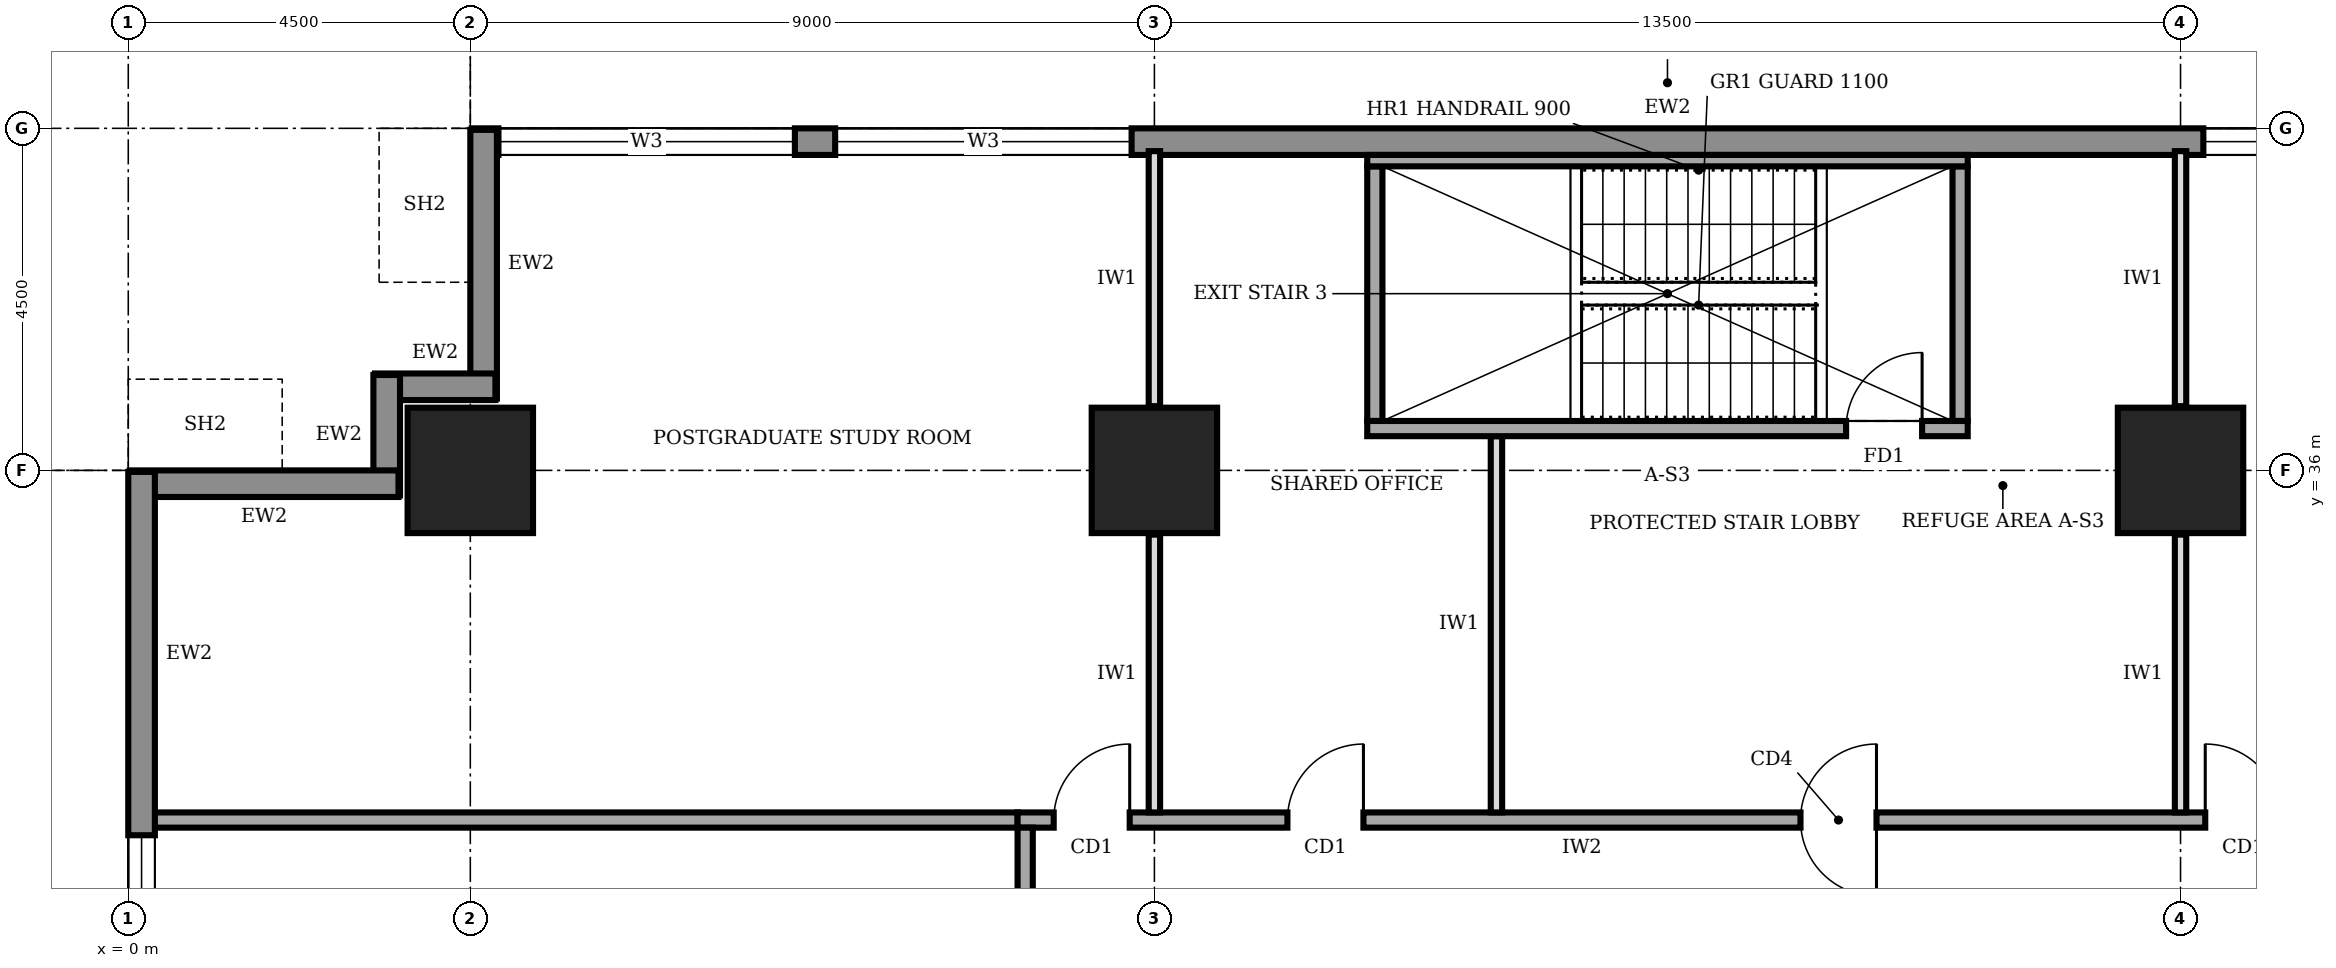
"""IFC4 building model, lengths in metres.
Left out: names, types, materials, properties, quantities, classifications, styles, units other than length and angle.
Written with IfcOpenShell. Run it as: python <this file> out.ifc"""

import sys

from ifc_helpers import new_model, si_unit, direction, frame, frame_2d, origin, origin_2d, place, context, subcontext, project, spatial, rectangle, extrude, element, fill, save


model = new_model("IFC4")
c1 = context("Model", 3, precision=1e-05, world=origin(), true_north=direction((0.0, 1.0)))
c2 = subcontext(c1, "Body", "Model", "MODEL_VIEW")
j1 = project(units=[si_unit("LENGTHUNIT", "METRE"), si_unit("PLANEANGLEUNIT", "RADIAN")], contexts=[c1])
p1 = place(None, origin())
s1 = spatial("IfcSite", under=j1, at=p1, CompositionType="ELEMENT")
p2 = place(p1, origin())
s2 = spatial("IfcBuilding", under=s1, at=p2, CompositionType="ELEMENT")
p3 = place(p2, frame((0.0, 0.0, 185.0)))
s3 = spatial("IfcBuildingStorey", under=s2, at=p3, CompositionType="ELEMENT", Elevation=185.0)
for number, where, z_axis, x_axis in (
    (1, (4.5, 36.0, 0.0), (0.0, 0.0, 1.0), (1.0, 0.0, 0.0)),
    (2, (13.5, 36.0, 0.0), (0.0, 0.0, 1.0), (1.0, 0.0, 0.0)),
    (3, (27.0, 36.0, 0.0), (0.0, 0.0, 1.0), (1.0, 0.0, 0.0)),
):
    element("IfcColumn", number, at=place(p3, frame(where, z_axis=z_axis, x_axis=x_axis)), inside=s3, PredefinedType="COLUMN", context=c2, shape_type="SweptSolid", body=[
        extrude(rectangle(XDim=1.65, YDim=1.65, at=origin_2d()), origin(), (0.0, 0.0, 1.0), 4.0),
    ])
p4 = place(p3, frame((35.98, 40.325, 0.0), z_axis=(0.0, 0.0, 1.0), x_axis=(-1.0, 0.0, 0.0)))
e4 = element("IfcWall", 4, at=p4, inside=s3, PredefinedType="STANDARD", context=c2, shape_type="SweptSolid", body=[
    extrude(rectangle(XDim=31.46, YDim=0.35, at=frame_2d((15.73, 0.0))), origin(), (0.0, 0.0, 1.0), 3.75),
])
p5 = place(p4, frame((27.21, 0.0, 0.95)))
e5 = element("IfcOpeningElement", 5, at=p5, cuts=e4, PredefinedType="OPENING", context=c2, shape_type="SweptSolid", body=[
    extrude(rectangle(XDim=3.9, YDim=1.8, at=frame_2d((1.95, 0.9))), frame((0.0, 0.185, 0.0), z_axis=(0.0, -1.0, 0.0), x_axis=(1.0, 0.0, 0.0)), (0.0, 0.0, 1.0), 0.37),
])
p6 = place(p4, frame((22.78, 0.0, 0.95)))
e6 = element("IfcOpeningElement", 6, at=p6, cuts=e4, PredefinedType="OPENING", context=c2, shape_type="SweptSolid", body=[
    extrude(rectangle(XDim=3.9, YDim=1.8, at=frame_2d((1.95, 0.9))), frame((0.0, 0.185, 0.0), z_axis=(0.0, -1.0, 0.0), x_axis=(1.0, 0.0, 0.0)), (0.0, 0.0, 1.0), 0.37),
])
p7 = place(p4, frame((4.78, 0.0, 0.95)))
e7 = element("IfcOpeningElement", 7, at=p7, cuts=e4, PredefinedType="OPENING", context=c2, shape_type="SweptSolid", body=[
    extrude(rectangle(XDim=3.9, YDim=1.8, at=frame_2d((1.95, 0.9))), frame((0.0, 0.185, 0.0), z_axis=(0.0, -1.0, 0.0), x_axis=(1.0, 0.0, 0.0)), (0.0, 0.0, 1.0), 0.37),
])
p8 = place(p3, frame((4.675, 40.48, 0.0), z_axis=(0.0, 0.0, 1.0), x_axis=(0.0, -1.0, 0.0)))
e8 = element("IfcWall", 8, at=p8, inside=s3, PredefinedType="STANDARD", context=c2, shape_type="SweptSolid", body=[
    extrude(rectangle(XDim=3.535, YDim=0.35, at=frame_2d((1.768, 0.0))), origin(), (0.0, 0.0, 1.0), 2.85),
])
for number, where, z_axis, x_axis in (
    (9, (4.83, 37.1, 0.0), (0.0, 0.0, 1.0), (-1.0, 0.0, 0.0)),
    (10, (3.4, 37.255, 0.0), (0.0, 0.0, 1.0), (0.0, -1.0, 0.0)),
):
    element("IfcWall", number, at=place(p3, frame(where, z_axis=z_axis, x_axis=x_axis)), inside=s3, PredefinedType="STANDARD", context=c2, shape_type="SweptSolid", body=[
        extrude(rectangle(XDim=1.585, YDim=0.35, at=frame_2d((0.792, 0.0))), origin(), (0.0, 0.0, 1.0), 3.75),
    ])
p9 = place(p3, frame((3.555, 35.825, 0.0), z_axis=(0.0, 0.0, 1.0), x_axis=(-1.0, 0.0, 0.0)))
e11 = element("IfcWall", 11, at=p9, inside=s3, PredefinedType="STANDARD", context=c2, shape_type="SweptSolid", body=[
    extrude(rectangle(XDim=3.535, YDim=0.35, at=frame_2d((1.768, 0.0))), origin(), (0.0, 0.0, 1.0), 2.85),
])
p10 = place(p3, frame((0.175, 35.98, 0.0), z_axis=(0.0, 0.0, 1.0), x_axis=(0.0, -1.0, 0.0)))
e12 = element("IfcWall", 12, at=p10, inside=s3, PredefinedType="STANDARD", context=c2, shape_type="SweptSolid", body=[
    extrude(rectangle(XDim=31.46, YDim=0.35, at=frame_2d((15.73, 0.0))), origin(), (0.0, 0.0, 1.0), 3.75),
])
p11 = place(p10, frame((27.21, 0.0, 0.95)))
e13 = element("IfcOpeningElement", 13, at=p11, cuts=e12, PredefinedType="OPENING", context=c2, shape_type="SweptSolid", body=[
    extrude(rectangle(XDim=3.9, YDim=1.8, at=frame_2d((1.95, 0.9))), frame((0.0, 0.185, 0.0), z_axis=(0.0, -1.0, 0.0), x_axis=(1.0, 0.0, 0.0)), (0.0, 0.0, 1.0), 0.37),
])
p12 = place(p10, frame((22.78, 0.0, 0.95)))
e14 = element("IfcOpeningElement", 14, at=p12, cuts=e12, PredefinedType="OPENING", context=c2, shape_type="SweptSolid", body=[
    extrude(rectangle(XDim=3.9, YDim=1.8, at=frame_2d((1.95, 0.9))), frame((0.0, 0.185, 0.0), z_axis=(0.0, -1.0, 0.0), x_axis=(1.0, 0.0, 0.0)), (0.0, 0.0, 1.0), 0.37),
])
p13 = place(p10, frame((18.28, 0.0, 0.95)))
e15 = element("IfcOpeningElement", 15, at=p13, cuts=e12, PredefinedType="OPENING", context=c2, shape_type="SweptSolid", body=[
    extrude(rectangle(XDim=3.9, YDim=1.8, at=frame_2d((1.95, 0.9))), frame((0.0, 0.185, 0.0), z_axis=(0.0, -1.0, 0.0), x_axis=(1.0, 0.0, 0.0)), (0.0, 0.0, 1.0), 0.37),
])
p14 = place(p10, frame((13.78, 0.0, 0.95)))
e16 = element("IfcOpeningElement", 16, at=p14, cuts=e12, PredefinedType="OPENING", context=c2, shape_type="SweptSolid", body=[
    extrude(rectangle(XDim=3.9, YDim=1.8, at=frame_2d((1.95, 0.9))), frame((0.0, 0.185, 0.0), z_axis=(0.0, -1.0, 0.0), x_axis=(1.0, 0.0, 0.0)), (0.0, 0.0, 1.0), 0.37),
])
p15 = place(p10, frame((9.28, 0.0, 0.95)))
e17 = element("IfcOpeningElement", 17, at=p15, cuts=e12, PredefinedType="OPENING", context=c2, shape_type="SweptSolid", body=[
    extrude(rectangle(XDim=3.9, YDim=1.8, at=frame_2d((1.95, 0.9))), frame((0.0, 0.185, 0.0), z_axis=(0.0, -1.0, 0.0), x_axis=(1.0, 0.0, 0.0)), (0.0, 0.0, 1.0), 0.37),
])
p16 = place(p10, frame((4.78, 0.0, 0.95)))
e18 = element("IfcOpeningElement", 18, at=p16, cuts=e12, PredefinedType="OPENING", context=c2, shape_type="SweptSolid", body=[
    extrude(rectangle(XDim=3.9, YDim=1.8, at=frame_2d((1.95, 0.9))), frame((0.0, 0.185, 0.0), z_axis=(0.0, -1.0, 0.0), x_axis=(1.0, 0.0, 0.0)), (0.0, 0.0, 1.0), 0.37),
])
p17 = place(p3, frame((28.6, 31.4, 0.0), z_axis=(0.0, 0.0, 1.0), x_axis=(-1.0, 0.0, 0.0)))
e19 = element("IfcWall", 19, at=p17, inside=s3, PredefinedType="SOLIDWALL", context=c2, shape_type="SweptSolid", body=[
    extrude(rectangle(XDim=16.9, YDim=0.2, at=frame_2d((8.45, 0.0))), origin(), (0.0, 0.0, 1.0), 3.75),
])
p18 = place(p17, frame((15.425, 0.0, 0.0)))
e20 = element("IfcOpeningElement", 20, at=p18, cuts=e19, PredefinedType="OPENING", context=c2, shape_type="SweptSolid", body=[
    extrude(rectangle(XDim=1.0, YDim=2.1, at=frame_2d((0.5, 1.05))), frame((0.0, 0.11, 0.0), z_axis=(0.0, -1.0, 0.0), x_axis=(1.0, 0.0, 0.0)), (0.0, 0.0, 1.0), 0.22),
])
p19 = place(p17, frame((12.35, 0.0, 0.0)))
e21 = element("IfcOpeningElement", 21, at=p19, cuts=e19, PredefinedType="OPENING", context=c2, shape_type="SweptSolid", body=[
    extrude(rectangle(XDim=1.0, YDim=2.1, at=frame_2d((0.5, 1.05))), frame((0.0, 0.11, 0.0), z_axis=(0.0, -1.0, 0.0), x_axis=(1.0, 0.0, 0.0)), (0.0, 0.0, 1.0), 0.22),
])
p20 = place(p17, frame((5.6, 0.0, 0.0)))
e22 = element("IfcOpeningElement", 22, at=p20, cuts=e19, PredefinedType="OPENING", context=c2, shape_type="SweptSolid", body=[
    extrude(rectangle(XDim=1.0, YDim=2.1, at=frame_2d((0.5, 1.05))), frame((0.0, 0.11, 0.0), z_axis=(0.0, -1.0, 0.0), x_axis=(1.0, 0.0, 0.0)), (0.0, 0.0, 1.0), 0.22),
])
p21 = place(p17, frame((0.275, 0.0, 0.0)))
e23 = element("IfcOpeningElement", 23, at=p21, cuts=e19, PredefinedType="OPENING", context=c2, shape_type="SweptSolid", body=[
    extrude(rectangle(XDim=1.0, YDim=2.1, at=frame_2d((0.5, 1.05))), frame((0.0, 0.11, 0.0), z_axis=(0.0, -1.0, 0.0), x_axis=(1.0, 0.0, 0.0)), (0.0, 0.0, 1.0), 0.22),
])
p22 = place(p3, frame((11.8, 31.3, 0.0), z_axis=(0.0, 0.0, 1.0), x_axis=(0.0, -1.0, 0.0)))
e24 = element("IfcWall", 24, at=p22, inside=s3, PredefinedType="SOLIDWALL", context=c2, shape_type="SweptSolid", body=[
    extrude(rectangle(XDim=22.3, YDim=0.2, at=frame_2d((11.15, 0.0))), origin(), (0.0, 0.0, 1.0), 3.75),
])
p23 = place(p22, frame((19.55, 0.0, 0.0)))
e25 = element("IfcOpeningElement", 25, at=p23, cuts=e24, PredefinedType="OPENING", context=c2, shape_type="SweptSolid", body=[
    extrude(rectangle(XDim=1.0, YDim=2.1, at=frame_2d((0.5, 1.05))), frame((0.0, 0.11, 0.0), z_axis=(0.0, -1.0, 0.0), x_axis=(1.0, 0.0, 0.0)), (0.0, 0.0, 1.0), 0.22),
])
p24 = place(p22, frame((15.65, 0.0, 0.0)))
e26 = element("IfcOpeningElement", 26, at=p24, cuts=e24, PredefinedType="OPENING", context=c2, shape_type="SweptSolid", body=[
    extrude(rectangle(XDim=0.9, YDim=2.1, at=frame_2d((0.45, 1.05))), frame((0.0, 0.11, 0.0), z_axis=(0.0, -1.0, 0.0), x_axis=(1.0, 0.0, 0.0)), (0.0, 0.0, 1.0), 0.22),
])
p25 = place(p22, frame((10.85, 0.0, 0.0)))
e27 = element("IfcOpeningElement", 27, at=p25, cuts=e24, PredefinedType="OPENING", context=c2, shape_type="SweptSolid", body=[
    extrude(rectangle(XDim=0.9, YDim=2.1, at=frame_2d((0.45, 1.05))), frame((0.0, 0.11, 0.0), z_axis=(0.0, -1.0, 0.0), x_axis=(1.0, 0.0, 0.0)), (0.0, 0.0, 1.0), 0.22),
])
p26 = place(p22, frame((7.8, 0.0, 0.0)))
e28 = element("IfcOpeningElement", 28, at=p26, cuts=e24, PredefinedType="OPENING", context=c2, shape_type="SweptSolid", body=[
    extrude(rectangle(XDim=0.9, YDim=2.1, at=frame_2d((0.45, 1.05))), frame((0.0, 0.11, 0.0), z_axis=(0.0, -1.0, 0.0), x_axis=(1.0, 0.0, 0.0)), (0.0, 0.0, 1.0), 0.22),
])
p27 = place(p22, frame((4.8, 0.0, 0.0)))
e29 = element("IfcOpeningElement", 29, at=p27, cuts=e24, PredefinedType="OPENING", context=c2, shape_type="SweptSolid", body=[
    extrude(rectangle(XDim=1.0, YDim=2.1, at=frame_2d((0.5, 1.05))), frame((0.0, 0.11, 0.0), z_axis=(0.0, -1.0, 0.0), x_axis=(1.0, 0.0, 0.0)), (0.0, 0.0, 1.0), 0.22),
])
p28 = place(p22, frame((12.9, 0.0, 0.0)))
e30 = element("IfcOpeningElement", 30, at=p28, cuts=e24, PredefinedType="OPENING", context=c2, shape_type="SweptSolid", body=[
    extrude(rectangle(XDim=1.0, YDim=2.1, at=frame_2d((0.5, 1.05))), frame((0.0, 0.11, 0.0), z_axis=(0.0, -1.0, 0.0), x_axis=(1.0, 0.0, 0.0)), (0.0, 0.0, 1.0), 0.22),
])
p29 = place(p22, frame((1.55, 0.0, 0.0)))
e31 = element("IfcOpeningElement", 31, at=p29, cuts=e24, PredefinedType="OPENING", context=c2, shape_type="SweptSolid", body=[
    extrude(rectangle(XDim=1.0, YDim=2.1, at=frame_2d((0.5, 1.05))), frame((0.0, 0.11, 0.0), z_axis=(0.0, -1.0, 0.0), x_axis=(1.0, 0.0, 0.0)), (0.0, 0.0, 1.0), 0.22),
])
p30 = place(p3, frame((0.3, 31.4, 0.0), z_axis=(0.0, 0.0, 1.0), x_axis=(1.0, 0.0, 0.0)))
e32 = element("IfcWall", 32, at=p30, inside=s3, PredefinedType="SOLIDWALL", context=c2, shape_type="SweptSolid", body=[
    extrude(rectangle(XDim=11.4, YDim=0.2, at=frame_2d((5.7, 0.0))), origin(), (0.0, 0.0, 1.0), 3.75),
])
p31 = place(p3, frame((13.5, 31.5, 0.0), z_axis=(0.0, 0.0, 1.0), x_axis=(0.0, 1.0, 0.0)))
e33 = element("IfcWall", 33, at=p31, inside=s3, PredefinedType="PARTITIONING", context=c2, shape_type="SweptSolid", body=[
    extrude(rectangle(XDim=3.655, YDim=0.15, at=frame_2d((1.828, 0.0))), origin(), (0.0, 0.0, 1.0), 2.85),
])
p32 = place(p3, frame((13.5, 36.845, 0.0), z_axis=(0.0, 0.0, 1.0), x_axis=(0.0, 1.0, 0.0)))
e34 = element("IfcWall", 34, at=p32, inside=s3, PredefinedType="PARTITIONING", context=c2, shape_type="SweptSolid", body=[
    extrude(rectangle(XDim=3.355, YDim=0.15, at=frame_2d((1.677, 0.0))), origin(), (0.0, 0.0, 1.0), 2.85),
])
p33 = place(p3, frame((18.0, 31.5, 0.0), z_axis=(0.0, 0.0, 1.0), x_axis=(0.0, 1.0, 0.0)))
e35 = element("IfcWall", 35, at=p33, inside=s3, PredefinedType="PARTITIONING", context=c2, shape_type="SweptSolid", body=[
    extrude(rectangle(XDim=4.95, YDim=0.15, at=frame_2d((2.475, 0.0))), origin(), (0.0, 0.0, 1.0), 3.75),
])
p34 = place(p3, frame((27.0, 31.5, 0.0), z_axis=(0.0, 0.0, 1.0), x_axis=(0.0, 1.0, 0.0)))
e36 = element("IfcWall", 36, at=p34, inside=s3, PredefinedType="PARTITIONING", context=c2, shape_type="SweptSolid", body=[
    extrude(rectangle(XDim=3.655, YDim=0.15, at=frame_2d((1.828, 0.0))), origin(), (0.0, 0.0, 1.0), 2.85),
])
p35 = place(p3, frame((27.0, 36.845, 0.0), z_axis=(0.0, 0.0, 1.0), x_axis=(0.0, 1.0, 0.0)))
e37 = element("IfcWall", 37, at=p35, inside=s3, PredefinedType="PARTITIONING", context=c2, shape_type="SweptSolid", body=[
    extrude(rectangle(XDim=3.355, YDim=0.15, at=frame_2d((1.677, 0.0))), origin(), (0.0, 0.0, 1.0), 2.85),
])
p36 = place(p3, frame((16.3, 36.55, 0.0), z_axis=(0.0, 0.0, 1.0), x_axis=(1.0, 0.0, 0.0)))
e38 = element("IfcWall", 38, at=p36, inside=s3, PredefinedType="SOLIDWALL", context=c2, shape_type="SweptSolid", body=[
    extrude(rectangle(XDim=7.9, YDim=0.2, at=frame_2d((3.95, 0.0))), origin(), (0.0, 0.0, 1.0), 3.75),
])
p37 = place(p36, frame((6.3, 0.0, 0.0)))
e39 = element("IfcOpeningElement", 39, at=p37, cuts=e38, PredefinedType="OPENING", context=c2, shape_type="SweptSolid", body=[
    extrude(rectangle(XDim=1.0, YDim=2.1, at=frame_2d((0.5, 1.05))), frame((0.0, 0.11, 0.0), z_axis=(0.0, -1.0, 0.0), x_axis=(1.0, 0.0, 0.0)), (0.0, 0.0, 1.0), 0.22),
])
p38 = place(p3, frame((16.3, 40.075, 0.0), z_axis=(0.0, 0.0, 1.0), x_axis=(1.0, 0.0, 0.0)))
e40 = element("IfcWall", 40, at=p38, inside=s3, PredefinedType="SOLIDWALL", context=c2, shape_type="SweptSolid", body=[
    extrude(rectangle(XDim=7.9, YDim=0.15, at=frame_2d((3.95, 0.0))), origin(), (0.0, 0.0, 1.0), 3.75),
])
for number, where, z_axis, x_axis in (
    (41, (16.4, 36.65, 0.0), (0.0, 0.0, 1.0), (0.0, 1.0, 0.0)),
    (42, (24.1, 36.65, 0.0), (0.0, 0.0, 1.0), (0.0, 1.0, 0.0)),
):
    element("IfcWall", number, at=place(p3, frame(where, z_axis=z_axis, x_axis=x_axis)), inside=s3, PredefinedType="SOLIDWALL", context=c2, shape_type="SweptSolid", body=[
        extrude(rectangle(XDim=3.35, YDim=0.2, at=frame_2d((1.675, 0.0))), origin(), (0.0, 0.0, 1.0), 3.75),
    ])
p39 = place(p5, origin())
e43 = element("IfcWindow", 43, at=p39, inside=s3, PartitioningType="SINGLE_PANEL", PredefinedType="WINDOW", context=c2, shape_type="SweptSolid", body=[
    extrude(rectangle(XDim=3.9, YDim=1.8, at=frame_2d((1.95, 0.9))), frame((0.0, 0.03, 0.0), z_axis=(0.0, -1.0, 0.0), x_axis=(1.0, 0.0, 0.0)), (0.0, 0.0, 1.0), 0.06),
])
fill(e5, e43)
p40 = place(p6, origin())
e44 = element("IfcWindow", 44, at=p40, inside=s3, PartitioningType="SINGLE_PANEL", PredefinedType="WINDOW", context=c2, shape_type="SweptSolid", body=[
    extrude(rectangle(XDim=3.9, YDim=1.8, at=frame_2d((1.95, 0.9))), frame((0.0, 0.03, 0.0), z_axis=(0.0, -1.0, 0.0), x_axis=(1.0, 0.0, 0.0)), (0.0, 0.0, 1.0), 0.06),
])
fill(e6, e44)
p41 = place(p7, origin())
e45 = element("IfcWindow", 45, at=p41, inside=s3, PartitioningType="SINGLE_PANEL", PredefinedType="WINDOW", context=c2, shape_type="SweptSolid", body=[
    extrude(rectangle(XDim=3.9, YDim=1.8, at=frame_2d((1.95, 0.9))), frame((0.0, 0.03, 0.0), z_axis=(0.0, -1.0, 0.0), x_axis=(1.0, 0.0, 0.0)), (0.0, 0.0, 1.0), 0.06),
])
fill(e7, e45)
p42 = place(p16, origin())
e46 = element("IfcWindow", 46, at=p42, inside=s3, PartitioningType="SINGLE_PANEL", PredefinedType="WINDOW", context=c2, shape_type="SweptSolid", body=[
    extrude(rectangle(XDim=3.9, YDim=1.8, at=frame_2d((1.95, 0.9))), frame((0.0, 0.03, 0.0), z_axis=(0.0, -1.0, 0.0), x_axis=(1.0, 0.0, 0.0)), (0.0, 0.0, 1.0), 0.06),
])
fill(e18, e46)
p43 = place(p18, frame((1.0, 0.0, 0.0), z_axis=(0.0, 0.0, 1.0), x_axis=(-1.0, 0.0, 0.0)))
e47 = element("IfcDoor", 47, at=p43, inside=s3, OperationType="SINGLE_SWING_RIGHT", PredefinedType="DOOR", context=c2, shape_type="SweptSolid", body=[
    extrude(rectangle(XDim=1.0, YDim=2.1, at=frame_2d((0.5, 1.05))), frame((0.0, 0.025, 0.0), z_axis=(0.0, -1.0, 0.0), x_axis=(1.0, 0.0, 0.0)), (0.0, 0.0, 1.0), 0.05),
])
fill(e20, e47)
p44 = place(p19, frame((1.0, 0.0, 0.0), z_axis=(0.0, 0.0, 1.0), x_axis=(-1.0, 0.0, 0.0)))
e48 = element("IfcDoor", 48, at=p44, inside=s3, OperationType="SINGLE_SWING_RIGHT", PredefinedType="DOOR", context=c2, shape_type="SweptSolid", body=[
    extrude(rectangle(XDim=1.0, YDim=2.1, at=frame_2d((0.5, 1.05))), frame((0.0, 0.025, 0.0), z_axis=(0.0, -1.0, 0.0), x_axis=(1.0, 0.0, 0.0)), (0.0, 0.0, 1.0), 0.05),
])
fill(e21, e48)
p45 = place(p20, origin())
e49 = element("IfcDoor", 49, at=p45, inside=s3, OperationType="DOUBLE_SWING_LEFT", PredefinedType="DOOR", context=c2, shape_type="SweptSolid", body=[
    extrude(rectangle(XDim=1.0, YDim=2.1, at=frame_2d((0.5, 1.05))), frame((0.0, 0.025, 0.0), z_axis=(0.0, -1.0, 0.0), x_axis=(1.0, 0.0, 0.0)), (0.0, 0.0, 1.0), 0.05),
])
fill(e22, e49)
p46 = place(p21, frame((1.0, 0.0, 0.0), z_axis=(0.0, 0.0, 1.0), x_axis=(-1.0, 0.0, 0.0)))
e50 = element("IfcDoor", 50, at=p46, inside=s3, OperationType="SINGLE_SWING_LEFT", PredefinedType="DOOR", context=c2, shape_type="SweptSolid", body=[
    extrude(rectangle(XDim=1.0, YDim=2.1, at=frame_2d((0.5, 1.05))), frame((0.0, 0.025, 0.0), z_axis=(0.0, -1.0, 0.0), x_axis=(1.0, 0.0, 0.0)), (0.0, 0.0, 1.0), 0.05),
])
fill(e23, e50)
p47 = place(p37, origin())
e51 = element("IfcDoor", 51, at=p47, inside=s3, OperationType="SINGLE_SWING_RIGHT", PredefinedType="DOOR", context=c2, shape_type="SweptSolid", body=[
    extrude(rectangle(XDim=1.0, YDim=2.1, at=frame_2d((0.5, 1.05))), frame((0.0, 0.025, 0.0), z_axis=(0.0, -1.0, 0.0), x_axis=(1.0, 0.0, 0.0)), (0.0, 0.0, 1.0), 0.05),
])
fill(e39, e51)
save(model, sys.argv[1])
